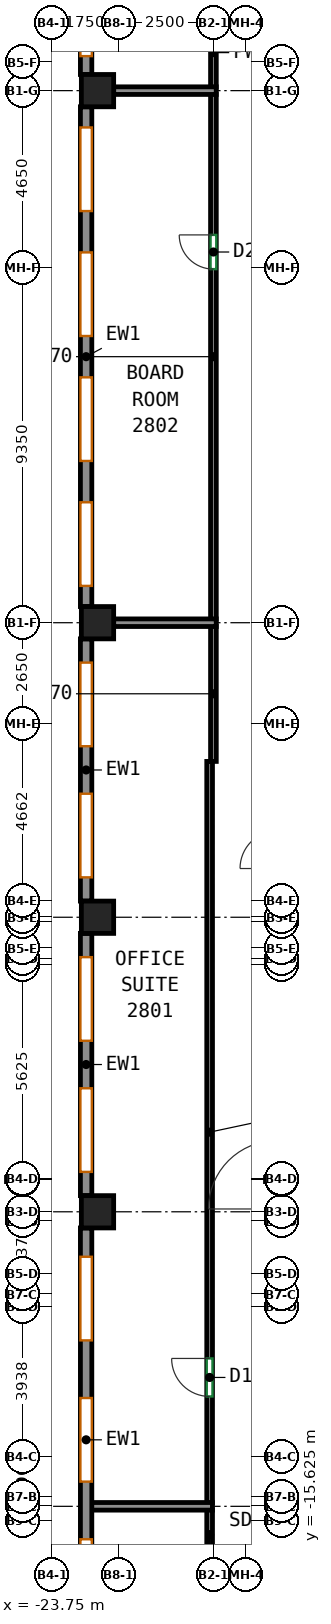
"""IFC4 building model, lengths in metres.
Left out: names, types, materials, properties, quantities, classifications, styles, units other than length and angle.
Written with IfcOpenShell. Run it as: python <this file> out.ifc"""

import sys

from ifc_helpers import new_model, si_unit, direction, frame, frame_2d, origin, origin_2d, place, context, subcontext, project, spatial, rectangle, extrude, source, transform, mapped, element, fill, save


model = new_model("IFC4")
c1 = context("Model", 3, precision=1e-05, world=origin(), true_north=direction((0.0, 1.0)))
c2 = subcontext(c1, "Body", "Model", "MODEL_VIEW")
j1 = project(units=[si_unit("LENGTHUNIT", "METRE"), si_unit("PLANEANGLEUNIT", "RADIAN")], contexts=[c1])
p1 = place(None, origin())
s1 = spatial("IfcSite", under=j1, at=p1, CompositionType="ELEMENT")
p2 = place(p1, origin())
s2 = spatial("IfcBuilding", under=s1, at=p2, CompositionType="ELEMENT")
p3 = place(p2, frame((0.0, 0.0, 120.6)))
s3 = spatial("IfcBuildingStorey", under=s2, at=p3, CompositionType="ELEMENT", Elevation=120.6)
m1 = source(origin(), c2, "Body", "SweptSolid", [
    extrude(rectangle(XDim=0.85, YDim=0.85, at=origin_2d()), origin(), (0.0, 0.0, 1.0), 3.72),
])
for number, where, z_axis, x_axis in (
    (1, (-22.55, -7.5, 0.0), (0.0, 0.0, 1.0), (1.0, 0.0, 0.0)),
    (2, (-22.55, 0.25, 0.0), (0.0, 0.0, 1.0), (1.0, 0.0, 0.0)),
    (3, (-22.55, 8.0, 0.0), (0.0, 0.0, 1.0), (1.0, 0.0, 0.0)),
    (4, (-22.55, 22.0, 0.0), (0.0, 0.0, 1.0), (1.0, 0.0, 0.0)),
):
    element("IfcColumn", number, at=place(p3, frame(where, z_axis=z_axis, x_axis=x_axis)), inside=s3, PredefinedType="COLUMN", context=c2, shape_type="MappedRepresentation", body=[
        mapped(m1, transform((0.0, 0.0, 0.0))),
    ])
m2 = source(origin(), c2, "Body", "SweptSolid", [
    extrude(rectangle(XDim=6.332, YDim=0.3, at=frame_2d((3.166, 0.0))), origin(), (0.0, 0.0, 1.0), 3.72),
])
p4 = place(p3, frame((-22.85, 28.757, 0.0), z_axis=(0.0, 0.0, 1.0), x_axis=(0.0, -1.0, 0.0)))
e5 = element("IfcWall", 5, at=p4, inside=s3, PredefinedType="SOLIDWALL", context=c2, shape_type="MappedRepresentation", body=[
    mapped(m2, transform((0.0, 0.0, 0.0))),
])
p5 = place(p4, frame((0.483, 0.0, 0.7)))
e6 = element("IfcOpeningElement", 6, at=p5, cuts=e5, PredefinedType="OPENING", context=c2, shape_type="SweptSolid", body=[
    extrude(rectangle(XDim=2.2, YDim=2.25, at=frame_2d((1.1, 1.125))), frame((0.0, 0.16, 0.0), z_axis=(0.0, -1.0, 0.0), x_axis=(1.0, 0.0, 0.0)), (0.0, 0.0, 1.0), 0.32),
])
p6 = place(p4, frame((3.649, 0.0, 0.7)))
e7 = element("IfcOpeningElement", 7, at=p6, cuts=e5, PredefinedType="OPENING", context=c2, shape_type="SweptSolid", body=[
    extrude(rectangle(XDim=2.2, YDim=2.25, at=frame_2d((1.1, 1.125))), frame((0.0, 0.16, 0.0), z_axis=(0.0, -1.0, 0.0), x_axis=(1.0, 0.0, 0.0)), (0.0, 0.0, 1.0), 0.32),
])
m3 = source(origin(), c2, "Body", "SweptSolid", [
    extrude(rectangle(XDim=13.15, YDim=0.3, at=frame_2d((6.575, 0.0))), origin(), (0.0, 0.0, 1.0), 3.72),
])
p7 = place(p3, frame((-22.85, 21.575, 0.0), z_axis=(0.0, 0.0, 1.0), x_axis=(0.0, -1.0, 0.0)))
e8 = element("IfcWall", 8, at=p7, inside=s3, PredefinedType="SOLIDWALL", context=c2, shape_type="MappedRepresentation", body=[
    mapped(m3, transform((0.0, 0.0, 0.0))),
])
p8 = place(p7, frame((0.544, 0.0, 0.7)))
e9 = element("IfcOpeningElement", 9, at=p8, cuts=e8, PredefinedType="OPENING", context=c2, shape_type="SweptSolid", body=[
    extrude(rectangle(XDim=2.2, YDim=2.25, at=frame_2d((1.1, 1.125))), frame((0.0, 0.16, 0.0), z_axis=(0.0, -1.0, 0.0), x_axis=(1.0, 0.0, 0.0)), (0.0, 0.0, 1.0), 0.32),
])
p9 = place(p7, frame((3.831, 0.0, 0.7)))
e10 = element("IfcOpeningElement", 10, at=p9, cuts=e8, PredefinedType="OPENING", context=c2, shape_type="SweptSolid", body=[
    extrude(rectangle(XDim=2.2, YDim=2.25, at=frame_2d((1.1, 1.125))), frame((0.0, 0.16, 0.0), z_axis=(0.0, -1.0, 0.0), x_axis=(1.0, 0.0, 0.0)), (0.0, 0.0, 1.0), 0.32),
])
p10 = place(p7, frame((7.119, 0.0, 0.7)))
e11 = element("IfcOpeningElement", 11, at=p10, cuts=e8, PredefinedType="OPENING", context=c2, shape_type="SweptSolid", body=[
    extrude(rectangle(XDim=2.2, YDim=2.25, at=frame_2d((1.1, 1.125))), frame((0.0, 0.16, 0.0), z_axis=(0.0, -1.0, 0.0), x_axis=(1.0, 0.0, 0.0)), (0.0, 0.0, 1.0), 0.32),
])
p11 = place(p7, frame((10.406, 0.0, 0.7)))
e12 = element("IfcOpeningElement", 12, at=p11, cuts=e8, PredefinedType="OPENING", context=c2, shape_type="SweptSolid", body=[
    extrude(rectangle(XDim=2.2, YDim=2.25, at=frame_2d((1.1, 1.125))), frame((0.0, 0.16, 0.0), z_axis=(0.0, -1.0, 0.0), x_axis=(1.0, 0.0, 0.0)), (0.0, 0.0, 1.0), 0.32),
])
m4 = source(origin(), c2, "Body", "SweptSolid", [
    extrude(rectangle(XDim=6.9, YDim=0.3, at=frame_2d((3.45, 0.0))), origin(), (0.0, 0.0, 1.0), 3.72),
])
p12 = place(p3, frame((-22.85, 7.575, 0.0), z_axis=(0.0, 0.0, 1.0), x_axis=(0.0, -1.0, 0.0)))
e13 = element("IfcWall", 13, at=p12, inside=s3, PredefinedType="SOLIDWALL", context=c2, shape_type="MappedRepresentation", body=[
    mapped(m4, transform((0.0, 0.0, 0.0))),
])
p13 = place(p12, frame((0.625, 0.0, 0.7)))
e14 = element("IfcOpeningElement", 14, at=p13, cuts=e13, PredefinedType="OPENING", context=c2, shape_type="SweptSolid", body=[
    extrude(rectangle(XDim=2.2, YDim=2.25, at=frame_2d((1.1, 1.125))), frame((0.0, 0.16, 0.0), z_axis=(0.0, -1.0, 0.0), x_axis=(1.0, 0.0, 0.0)), (0.0, 0.0, 1.0), 0.32),
])
p14 = place(p12, frame((4.075, 0.0, 0.7)))
e15 = element("IfcOpeningElement", 15, at=p14, cuts=e13, PredefinedType="OPENING", context=c2, shape_type="SweptSolid", body=[
    extrude(rectangle(XDim=2.2, YDim=2.25, at=frame_2d((1.1, 1.125))), frame((0.0, 0.16, 0.0), z_axis=(0.0, -1.0, 0.0), x_axis=(1.0, 0.0, 0.0)), (0.0, 0.0, 1.0), 0.32),
])
p15 = place(p3, frame((-22.85, -0.175, 0.0), z_axis=(0.0, 0.0, 1.0), x_axis=(0.0, -1.0, 0.0)))
e16 = element("IfcWall", 16, at=p15, inside=s3, PredefinedType="SOLIDWALL", context=c2, shape_type="MappedRepresentation", body=[
    mapped(m4, transform((0.0, 0.0, 0.0))),
])
p16 = place(p15, frame((0.625, 0.0, 0.7)))
e17 = element("IfcOpeningElement", 17, at=p16, cuts=e16, PredefinedType="OPENING", context=c2, shape_type="SweptSolid", body=[
    extrude(rectangle(XDim=2.2, YDim=2.25, at=frame_2d((1.1, 1.125))), frame((0.0, 0.16, 0.0), z_axis=(0.0, -1.0, 0.0), x_axis=(1.0, 0.0, 0.0)), (0.0, 0.0, 1.0), 0.32),
])
p17 = place(p15, frame((4.075, 0.0, 0.7)))
e18 = element("IfcOpeningElement", 18, at=p17, cuts=e16, PredefinedType="OPENING", context=c2, shape_type="SweptSolid", body=[
    extrude(rectangle(XDim=2.2, YDim=2.25, at=frame_2d((1.1, 1.125))), frame((0.0, 0.16, 0.0), z_axis=(0.0, -1.0, 0.0), x_axis=(1.0, 0.0, 0.0)), (0.0, 0.0, 1.0), 0.32),
])
m5 = source(origin(), c2, "Body", "SweptSolid", [
    extrude(rectangle(XDim=11.15, YDim=0.3, at=frame_2d((5.575, 0.0))), origin(), (0.0, 0.0, 1.0), 3.72),
])
p18 = place(p3, frame((-22.85, -7.925, 0.0), z_axis=(0.0, 0.0, 1.0), x_axis=(0.0, -1.0, 0.0)))
e19 = element("IfcWall", 19, at=p18, inside=s3, PredefinedType="SOLIDWALL", context=c2, shape_type="MappedRepresentation", body=[
    mapped(m5, transform((0.0, 0.0, 0.0))),
])
p19 = place(p18, frame((0.758, 0.0, 0.7)))
e20 = element("IfcOpeningElement", 20, at=p19, cuts=e19, PredefinedType="OPENING", context=c2, shape_type="SweptSolid", body=[
    extrude(rectangle(XDim=2.2, YDim=2.25, at=frame_2d((1.1, 1.125))), frame((0.0, 0.16, 0.0), z_axis=(0.0, -1.0, 0.0), x_axis=(1.0, 0.0, 0.0)), (0.0, 0.0, 1.0), 0.32),
])
p20 = place(p18, frame((4.475, 0.0, 0.7)))
e21 = element("IfcOpeningElement", 21, at=p20, cuts=e19, PredefinedType="OPENING", context=c2, shape_type="SweptSolid", body=[
    extrude(rectangle(XDim=2.2, YDim=2.25, at=frame_2d((1.1, 1.125))), frame((0.0, 0.16, 0.0), z_axis=(0.0, -1.0, 0.0), x_axis=(1.0, 0.0, 0.0)), (0.0, 0.0, 1.0), 0.32),
])
p21 = place(p18, frame((8.192, 0.0, 0.7)))
e22 = element("IfcOpeningElement", 22, at=p21, cuts=e19, PredefinedType="OPENING", context=c2, shape_type="SweptSolid", body=[
    extrude(rectangle(XDim=2.2, YDim=2.25, at=frame_2d((1.1, 1.125))), frame((0.0, 0.16, 0.0), z_axis=(0.0, -1.0, 0.0), x_axis=(1.0, 0.0, 0.0)), (0.0, 0.0, 1.0), 0.32),
])
p22 = place(p3, frame((-19.6, -15.16, 0.0), z_axis=(0.0, 0.0, 1.0), x_axis=(0.0, 1.0, 0.0)))
e23 = element("IfcWall", 23, at=p22, inside=s3, PredefinedType="PARTITIONING", context=c2, shape_type="SweptSolid", body=[
    extrude(rectangle(XDim=19.51, YDim=0.15, at=frame_2d((9.755, 0.0))), origin(), (0.0, 0.0, 1.0), 3.07),
])
p23 = place(p22, frame((2.801, 0.0, 0.0)))
e24 = element("IfcOpeningElement", 24, at=p23, cuts=e23, PredefinedType="OPENING", context=c2, shape_type="SweptSolid", body=[
    extrude(rectangle(XDim=1.0, YDim=2.1, at=frame_2d((0.5, 1.05))), frame((0.0, 0.085, 0.0), z_axis=(0.0, -1.0, 0.0), x_axis=(1.0, 0.0, 0.0)), (0.0, 0.0, 1.0), 0.17),
])
p24 = place(p3, frame((-19.5, 4.35, 0.0), z_axis=(0.0, 0.0, 1.0), x_axis=(0.0, 1.0, 0.0)))
e25 = element("IfcWall", 25, at=p24, inside=s3, PredefinedType="PARTITIONING", context=c2, shape_type="SweptSolid", body=[
    extrude(rectangle(XDim=3.56, YDim=0.15, at=frame_2d((1.78, 0.0))), origin(), (0.0, 0.0, 1.0), 3.07),
])
p25 = place(p3, frame((-19.6, -16.648, 0.0), z_axis=(0.0, 0.0, 1.0), x_axis=(0.0, 1.0, 0.0)))
e26 = element("IfcWall", 26, at=p25, inside=s3, PredefinedType="PARTITIONING", context=c2, shape_type="SweptSolid", body=[
    extrude(rectangle(XDim=1.308, YDim=0.15, at=frame_2d((0.654, 0.0))), origin(), (0.0, 0.0, 1.0), 3.07),
])
p26 = place(p3, frame((-19.5, 22.09, 0.0), z_axis=(0.0, 0.0, 1.0), x_axis=(0.0, 1.0, 0.0)))
e27 = element("IfcWall", 27, at=p26, inside=s3, PredefinedType="PARTITIONING", context=c2, shape_type="SweptSolid", body=[
    extrude(rectangle(XDim=3.035, YDim=0.15, at=frame_2d((1.518, 0.0))), origin(), (0.0, 0.0, 1.0), 3.07),
])
p27 = place(p26, frame((1.631, 0.0, 0.0)))
e28 = element("IfcOpeningElement", 28, at=p27, cuts=e27, PredefinedType="OPENING", context=c2, shape_type="SweptSolid", body=[
    extrude(rectangle(XDim=1.0, YDim=2.1, at=frame_2d((0.5, 1.05))), frame((0.0, 0.085, 0.0), z_axis=(0.0, -1.0, 0.0), x_axis=(1.0, 0.0, 0.0)), (0.0, 0.0, 1.0), 0.17),
])
p28 = place(p3, frame((-19.5, 8.09, 0.0), z_axis=(0.0, 0.0, 1.0), x_axis=(0.0, 1.0, 0.0)))
e29 = element("IfcWall", 29, at=p28, inside=s3, PredefinedType="PARTITIONING", context=c2, shape_type="SweptSolid", body=[
    extrude(rectangle(XDim=13.82, YDim=0.15, at=frame_2d((6.91, 0.0))), origin(), (0.0, 0.0, 1.0), 3.07),
])
p29 = place(p28, frame((9.214, 0.0, 0.0)))
e30 = element("IfcOpeningElement", 30, at=p29, cuts=e29, PredefinedType="OPENING", context=c2, shape_type="SweptSolid", body=[
    extrude(rectangle(XDim=0.9, YDim=2.1, at=frame_2d((0.45, 1.05))), frame((0.0, 0.085, 0.0), z_axis=(0.0, -1.0, 0.0), x_axis=(1.0, 0.0, 0.0)), (0.0, 0.0, 1.0), 0.17),
])
p30 = place(p3, frame((-22.75, -15.25, 0.0), z_axis=(0.0, 0.0, 1.0), x_axis=(1.0, 0.0, 0.0)))
e31 = element("IfcWall", 31, at=p30, inside=s3, PredefinedType="PARTITIONING", context=c2, shape_type="SweptSolid", body=[
    extrude(rectangle(XDim=3.224, YDim=0.2, at=frame_2d((1.612, 0.0))), origin(), (0.0, 0.0, 1.0), 3.72),
])
for number, where, z_axis, x_axis in (
    (32, (-22.125, 8.0, 0.0), (0.0, 0.0, 1.0), (1.0, 0.0, 0.0)),
    (33, (-22.125, 22.0, 0.0), (0.0, 0.0, 1.0), (1.0, 0.0, 0.0)),
):
    element("IfcWall", number, at=place(p3, frame(where, z_axis=z_axis, x_axis=x_axis)), inside=s3, PredefinedType="PARTITIONING", context=c2, shape_type="SweptSolid", body=[
        extrude(rectangle(XDim=2.699, YDim=0.2, at=frame_2d((1.35, 0.0))), origin(), (0.0, 0.0, 1.0), 3.72),
    ])
p31 = place(p6, origin())
e34 = element("IfcWindow", 34, at=p31, inside=s3, PartitioningType="SINGLE_PANEL", PredefinedType="WINDOW", context=c2, shape_type="SweptSolid", body=[
    extrude(rectangle(XDim=2.2, YDim=2.25, at=frame_2d((1.1, 1.125))), frame((0.0, 0.03, 0.0), z_axis=(0.0, -1.0, 0.0), x_axis=(1.0, 0.0, 0.0)), (0.0, 0.0, 1.0), 0.06),
])
fill(e7, e34)
p32 = place(p8, origin())
e35 = element("IfcWindow", 35, at=p32, inside=s3, PartitioningType="SINGLE_PANEL", PredefinedType="WINDOW", context=c2, shape_type="SweptSolid", body=[
    extrude(rectangle(XDim=2.2, YDim=2.25, at=frame_2d((1.1, 1.125))), frame((0.0, 0.03, 0.0), z_axis=(0.0, -1.0, 0.0), x_axis=(1.0, 0.0, 0.0)), (0.0, 0.0, 1.0), 0.06),
])
fill(e9, e35)
p33 = place(p9, origin())
e36 = element("IfcWindow", 36, at=p33, inside=s3, PartitioningType="SINGLE_PANEL", PredefinedType="WINDOW", context=c2, shape_type="SweptSolid", body=[
    extrude(rectangle(XDim=2.2, YDim=2.25, at=frame_2d((1.1, 1.125))), frame((0.0, 0.03, 0.0), z_axis=(0.0, -1.0, 0.0), x_axis=(1.0, 0.0, 0.0)), (0.0, 0.0, 1.0), 0.06),
])
fill(e10, e36)
p34 = place(p10, origin())
e37 = element("IfcWindow", 37, at=p34, inside=s3, PartitioningType="SINGLE_PANEL", PredefinedType="WINDOW", context=c2, shape_type="SweptSolid", body=[
    extrude(rectangle(XDim=2.2, YDim=2.25, at=frame_2d((1.1, 1.125))), frame((0.0, 0.03, 0.0), z_axis=(0.0, -1.0, 0.0), x_axis=(1.0, 0.0, 0.0)), (0.0, 0.0, 1.0), 0.06),
])
fill(e11, e37)
p35 = place(p11, origin())
e38 = element("IfcWindow", 38, at=p35, inside=s3, PartitioningType="SINGLE_PANEL", PredefinedType="WINDOW", context=c2, shape_type="SweptSolid", body=[
    extrude(rectangle(XDim=2.2, YDim=2.25, at=frame_2d((1.1, 1.125))), frame((0.0, 0.03, 0.0), z_axis=(0.0, -1.0, 0.0), x_axis=(1.0, 0.0, 0.0)), (0.0, 0.0, 1.0), 0.06),
])
fill(e12, e38)
p36 = place(p13, origin())
e39 = element("IfcWindow", 39, at=p36, inside=s3, PartitioningType="SINGLE_PANEL", PredefinedType="WINDOW", context=c2, shape_type="SweptSolid", body=[
    extrude(rectangle(XDim=2.2, YDim=2.25, at=frame_2d((1.1, 1.125))), frame((0.0, 0.03, 0.0), z_axis=(0.0, -1.0, 0.0), x_axis=(1.0, 0.0, 0.0)), (0.0, 0.0, 1.0), 0.06),
])
fill(e14, e39)
p37 = place(p14, origin())
e40 = element("IfcWindow", 40, at=p37, inside=s3, PartitioningType="SINGLE_PANEL", PredefinedType="WINDOW", context=c2, shape_type="SweptSolid", body=[
    extrude(rectangle(XDim=2.2, YDim=2.25, at=frame_2d((1.1, 1.125))), frame((0.0, 0.03, 0.0), z_axis=(0.0, -1.0, 0.0), x_axis=(1.0, 0.0, 0.0)), (0.0, 0.0, 1.0), 0.06),
])
fill(e15, e40)
p38 = place(p16, origin())
e41 = element("IfcWindow", 41, at=p38, inside=s3, PartitioningType="SINGLE_PANEL", PredefinedType="WINDOW", context=c2, shape_type="SweptSolid", body=[
    extrude(rectangle(XDim=2.2, YDim=2.25, at=frame_2d((1.1, 1.125))), frame((0.0, 0.03, 0.0), z_axis=(0.0, -1.0, 0.0), x_axis=(1.0, 0.0, 0.0)), (0.0, 0.0, 1.0), 0.06),
])
fill(e17, e41)
p39 = place(p17, origin())
e42 = element("IfcWindow", 42, at=p39, inside=s3, PartitioningType="SINGLE_PANEL", PredefinedType="WINDOW", context=c2, shape_type="SweptSolid", body=[
    extrude(rectangle(XDim=2.2, YDim=2.25, at=frame_2d((1.1, 1.125))), frame((0.0, 0.03, 0.0), z_axis=(0.0, -1.0, 0.0), x_axis=(1.0, 0.0, 0.0)), (0.0, 0.0, 1.0), 0.06),
])
fill(e18, e42)
p40 = place(p19, origin())
e43 = element("IfcWindow", 43, at=p40, inside=s3, PartitioningType="SINGLE_PANEL", PredefinedType="WINDOW", context=c2, shape_type="SweptSolid", body=[
    extrude(rectangle(XDim=2.2, YDim=2.25, at=frame_2d((1.1, 1.125))), frame((0.0, 0.03, 0.0), z_axis=(0.0, -1.0, 0.0), x_axis=(1.0, 0.0, 0.0)), (0.0, 0.0, 1.0), 0.06),
])
fill(e20, e43)
p41 = place(p20, origin())
e44 = element("IfcWindow", 44, at=p41, inside=s3, PartitioningType="SINGLE_PANEL", PredefinedType="WINDOW", context=c2, shape_type="SweptSolid", body=[
    extrude(rectangle(XDim=2.2, YDim=2.25, at=frame_2d((1.1, 1.125))), frame((0.0, 0.03, 0.0), z_axis=(0.0, -1.0, 0.0), x_axis=(1.0, 0.0, 0.0)), (0.0, 0.0, 1.0), 0.06),
])
fill(e21, e44)
p42 = place(p21, origin())
e45 = element("IfcWindow", 45, at=p42, inside=s3, PartitioningType="SINGLE_PANEL", PredefinedType="WINDOW", context=c2, shape_type="SweptSolid", body=[
    extrude(rectangle(XDim=2.2, YDim=2.25, at=frame_2d((1.1, 1.125))), frame((0.0, 0.03, 0.0), z_axis=(0.0, -1.0, 0.0), x_axis=(1.0, 0.0, 0.0)), (0.0, 0.0, 1.0), 0.06),
])
fill(e22, e45)
p43 = place(p23, origin())
e46 = element("IfcDoor", 46, at=p43, inside=s3, OperationType="SINGLE_SWING_RIGHT", PredefinedType="DOOR", context=c2, shape_type="SweptSolid", body=[
    extrude(rectangle(XDim=1.0, YDim=2.1, at=frame_2d((0.5, 1.05))), frame((0.0, 0.025, 0.0), z_axis=(0.0, -1.0, 0.0), x_axis=(1.0, 0.0, 0.0)), (0.0, 0.0, 1.0), 0.05),
])
fill(e24, e46)
p44 = place(p29, origin())
e47 = element("IfcDoor", 47, at=p44, inside=s3, OperationType="SINGLE_SWING_RIGHT", PredefinedType="DOOR", context=c2, shape_type="SweptSolid", body=[
    extrude(rectangle(XDim=0.9, YDim=2.1, at=frame_2d((0.45, 1.05))), frame((0.0, 0.025, 0.0), z_axis=(0.0, -1.0, 0.0), x_axis=(1.0, 0.0, 0.0)), (0.0, 0.0, 1.0), 0.05),
])
fill(e30, e47)
save(model, sys.argv[1])
